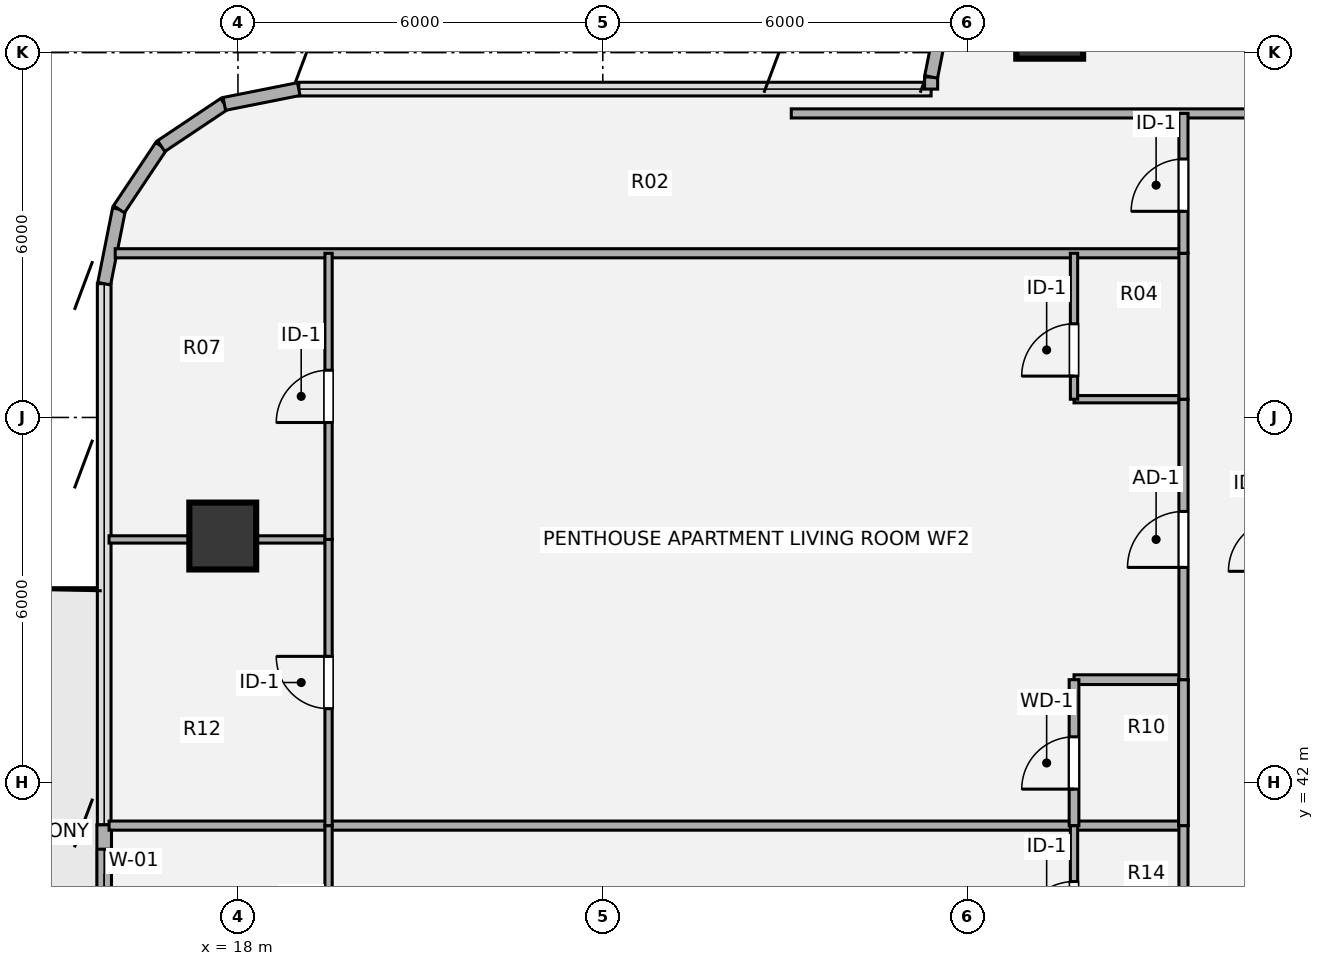
"""IFC4 building model, lengths in metres.
Left out: names, types, materials, properties, quantities, classifications, styles, units other than length and angle.
Written with IfcOpenShell. Run it as: python <this file> out.ifc"""

import sys

from ifc_helpers import new_model, si_unit, direction, frame, frame_2d, origin, origin_2d, place, context, subcontext, project, spatial, rectangle, hollow_circle, extrude, source, transform, mapped, element, fill, save


model = new_model("IFC4")
c1 = context("Model", 3, precision=1e-05, world=origin(), true_north=direction((0.0, 1.0)))
c2 = subcontext(c1, "Body", "Model", "MODEL_VIEW")
j1 = project(units=[si_unit("LENGTHUNIT", "METRE"), si_unit("PLANEANGLEUNIT", "RADIAN")], contexts=[c1])
p1 = place(None, origin())
s1 = spatial("IfcSite", under=j1, at=p1, CompositionType="ELEMENT")
p2 = place(p1, origin())
s2 = spatial("IfcBuilding", under=s1, at=p2, CompositionType="ELEMENT")
p3 = place(p2, frame((0.0, 0.0, 156.42)))
s3 = spatial("IfcBuildingStorey", under=s2, at=p3, CompositionType="ELEMENT", Elevation=156.42)
m1 = source(origin(), c2, "Body", "SweptSolid", [
    extrude(hollow_circle(Radius=0.55, WallThickness=0.04, at=origin_2d()), origin(), (0.0, 0.0, 1.0), 3.78),
])
for number, where, z_axis, x_axis in (
    (1, (17.75, 46.05, 0.0), (0.0, 0.0, 1.0), (1.0, 0.0, 0.0)),
    (2, (31.35, 54.45, 0.0), (0.0, 0.0, 1.0), (1.0, 0.0, 0.0)),
):
    element("IfcColumn", number, at=place(p3, frame(where, z_axis=z_axis, x_axis=x_axis)), inside=s3, PredefinedType="COLUMN", context=c2, shape_type="MappedRepresentation", body=[
        mapped(m1, transform((0.0, 0.0, 0.0), x_axis=(1.0, 0.0, 0.0), y_axis=(0.0, 1.0, 0.0), z_axis=(0.0, 0.0, 1.0), scale=1.0)),
    ])
p4 = place(p3, frame((15.8, 37.7, 0.0), z_axis=(0.0, 0.0, 1.0), x_axis=(0.0, 1.0, 0.0)))
e3 = element("IfcWall", 3, at=p4, inside=s3, PredefinedType="SOLIDWALL", context=c2, shape_type="SweptSolid", body=[
    extrude(rectangle(XDim=3.6, YDim=0.24, at=frame_2d((1.8, 0.0))), origin(), (0.0, 0.0, 1.0), 3.53),
])
p5 = place(p4, frame((0.4, 0.0, 0.0)))
e4 = element("IfcOpeningElement", 4, at=p5, cuts=e3, PredefinedType="OPENING", context=c2, shape_type="SweptSolid", body=[
    extrude(rectangle(XDim=1.05, YDim=2.15, at=origin_2d()), frame((0.525, 0.13, 1.075), z_axis=(0.0, -1.0, 0.0), x_axis=(1.0, 0.0, 0.0)), (0.0, 0.0, 1.0), 0.26),
])
p6 = place(p4, frame((1.85, 0.0, 0.85)))
e5 = element("IfcOpeningElement", 5, at=p6, cuts=e3, PredefinedType="OPENING", context=c2, shape_type="SweptSolid", body=[
    extrude(rectangle(XDim=1.35, YDim=1.35, at=origin_2d()), frame((0.675, 0.13, 0.675), z_axis=(0.0, -1.0, 0.0), x_axis=(1.0, 0.0, 0.0)), (0.0, 0.0, 1.0), 0.26),
])
for number, where, z_axis, x_axis in (
    (6, (15.8, 50.2, 0.0), (0.0, 0.0, 1.0), (0.195, 0.981, 0.0)),
    (7, (16.044, 51.425, 0.0), (0.0, 0.0, 1.0), (0.556, 0.831, 0.0)),
    (8, (16.737, 52.463, 0.0), (0.0, 0.0, 1.0), (0.831, 0.556, 0.0)),
    (9, (17.775, 53.156, 0.0), (0.0, 0.0, 1.0), (0.981, 0.195, 0.0)),
):
    element("IfcWall", number, at=place(p3, frame(where, z_axis=z_axis, x_axis=x_axis)), inside=s3, PredefinedType="SOLIDWALL", context=c2, shape_type="SweptSolid", body=[
        extrude(rectangle(XDim=1.249, YDim=0.215, at=frame_2d((0.624, 0.0))), origin(), (0.0, 0.0, 1.0), 3.53),
    ])
p7 = place(p3, frame((29.4, 53.4, 0.0), z_axis=(0.0, 0.0, 1.0), x_axis=(0.0, 1.0, 0.0)))
e10 = element("IfcWall", 10, at=p7, inside=s3, PredefinedType="SOLIDWALL", context=c2, shape_type="SweptSolid", body=[
    extrude(rectangle(XDim=0.2, YDim=0.215, at=frame_2d((0.1, 0.0))), origin(), (0.0, 0.0, 1.0), 3.53),
])
p8 = place(p3, frame((29.4, 53.6, 0.0), z_axis=(0.0, 0.0, 1.0), x_axis=(0.195127417394, 0.980777900945, 0.0)))
e11 = element("IfcWall", 11, at=p8, inside=s3, PredefinedType="SOLIDWALL", context=c2, shape_type="SweptSolid", body=[
    extrude(rectangle(XDim=1.092, YDim=0.215, at=frame_2d((0.546, 0.0))), origin(), (0.0, 0.0, 1.0), 3.53),
])
p9 = place(p3, frame((15.88, 41.288, 0.0), z_axis=(0.0, 0.0, 1.0), x_axis=(1.0, 0.0, 0.0)))
e12 = element("IfcWall", 12, at=p9, inside=s3, PredefinedType="PARTITIONING", context=c2, shape_type="SweptSolid", body=[
    extrude(rectangle(XDim=17.67, YDim=0.15, at=frame_2d((8.835, 0.0))), origin(), (0.0, 0.0, 1.0), 2.982),
])
p10 = place(p3, frame((31.75, 43.688, 0.0), z_axis=(0.0, 0.0, 1.0), x_axis=(1.0, 0.0, 0.0)))
e13 = element("IfcWall", 13, at=p10, inside=s3, PredefinedType="PLUMBINGWALL", context=c2, shape_type="SweptSolid", body=[
    extrude(rectangle(XDim=1.8, YDim=0.16, at=frame_2d((0.9, 0.0))), origin(), (0.0, 0.0, 1.0), 3.259),
])
p11 = place(p3, frame((15.88, 45.994, 0.0), z_axis=(0.0, 0.0, 1.0), x_axis=(1.0, 0.0, 0.0)))
e14 = element("IfcWall", 14, at=p11, inside=s3, PredefinedType="PARTITIONING", context=c2, shape_type="SweptSolid", body=[
    extrude(rectangle(XDim=3.61, YDim=0.12, at=frame_2d((1.805, 0.0))), origin(), (0.0, 0.0, 1.0), 2.903),
])
p12 = place(p3, frame((31.75, 48.3, 0.0), z_axis=(0.0, 0.0, 1.0), x_axis=(1.0, 0.0, 0.0)))
e15 = element("IfcWall", 15, at=p12, inside=s3, PredefinedType="PARTITIONING", context=c2, shape_type="SweptSolid", body=[
    extrude(rectangle(XDim=1.8, YDim=0.12, at=frame_2d((0.9, 0.0))), origin(), (0.0, 0.0, 1.0), 3.259),
])
p13 = place(p3, frame((15.981, 50.7, 0.0), z_axis=(0.0, 0.0, 1.0), x_axis=(1.0, 0.0, 0.0)))
e16 = element("IfcWall", 16, at=p13, inside=s3, PredefinedType="PARTITIONING", context=c2, shape_type="SweptSolid", body=[
    extrude(rectangle(XDim=17.569, YDim=0.15, at=frame_2d((8.785, 0.0))), origin(), (0.0, 0.0, 1.0), 3.308),
])
p14 = place(p3, frame((27.1, 53.0, 0.0), z_axis=(0.0, 0.0, 1.0), x_axis=(1.0, 0.0, 0.0)))
e17 = element("IfcWall", 17, at=p14, inside=s3, PredefinedType="PARTITIONING", context=c2, shape_type="SweptSolid", body=[
    extrude(rectangle(XDim=17.8, YDim=0.15, at=frame_2d((8.9, 0.0))), origin(), (0.0, 0.0, 1.0), 3.308),
])
p15 = place(p14, frame((8.375, 0.0, 0.0)))
e18 = element("IfcOpeningElement", 18, at=p15, cuts=e17, PredefinedType="OPENING", context=c2, shape_type="SweptSolid", body=[
    extrude(rectangle(XDim=1.05, YDim=2.1, at=origin_2d()), frame((0.525, 0.085, 1.05), z_axis=(0.0, -1.0, 0.0), x_axis=(1.0, 0.0, 0.0)), (0.0, 0.0, 1.0), 0.17),
])
p16 = place(p3, frame((19.49, 36.944, 0.0), z_axis=(0.0, 0.0, 1.0), x_axis=(0.0, 1.0, 0.0)))
e19 = element("IfcWall", 19, at=p16, inside=s3, PredefinedType="PARTITIONING", context=c2, shape_type="SweptSolid", body=[
    extrude(rectangle(XDim=4.344, YDim=0.12, at=frame_2d((2.172, 0.0))), origin(), (0.0, 0.0, 1.0), 3.5),
])
p17 = place(p16, frame((1.742, 0.0, 0.0)))
e20 = element("IfcOpeningElement", 20, at=p17, cuts=e19, PredefinedType="OPENING", context=c2, shape_type="SweptSolid", body=[
    extrude(rectangle(XDim=0.86, YDim=2.1, at=origin_2d()), frame((0.43, 0.07, 1.05), z_axis=(0.0, -1.0, 0.0), x_axis=(1.0, 0.0, 0.0)), (0.0, 0.0, 1.0), 0.14),
])
p18 = place(p3, frame((19.49, 41.288, 0.0), z_axis=(0.0, 0.0, 1.0), x_axis=(0.0, 1.0, 0.0)))
e21 = element("IfcWall", 21, at=p18, inside=s3, PredefinedType="PARTITIONING", context=c2, shape_type="SweptSolid", body=[
    extrude(rectangle(XDim=4.706, YDim=0.12, at=frame_2d((2.353, 0.0))), origin(), (0.0, 0.0, 1.0), 3.5),
])
p19 = place(p18, frame((1.923, 0.0, 0.0)))
e22 = element("IfcOpeningElement", 22, at=p19, cuts=e21, PredefinedType="OPENING", context=c2, shape_type="SweptSolid", body=[
    extrude(rectangle(XDim=0.86, YDim=2.1, at=origin_2d()), frame((0.43, 0.07, 1.05), z_axis=(0.0, -1.0, 0.0), x_axis=(1.0, 0.0, 0.0)), (0.0, 0.0, 1.0), 0.14),
])
p20 = place(p3, frame((19.49, 45.994, 0.0), z_axis=(0.0, 0.0, 1.0), x_axis=(0.0, 1.0, 0.0)))
e23 = element("IfcWall", 23, at=p20, inside=s3, PredefinedType="PARTITIONING", context=c2, shape_type="SweptSolid", body=[
    extrude(rectangle(XDim=4.706, YDim=0.12, at=frame_2d((2.353, 0.0))), origin(), (0.0, 0.0, 1.0), 3.5),
])
p21 = place(p20, frame((1.923, 0.0, 0.0)))
e24 = element("IfcOpeningElement", 24, at=p21, cuts=e23, PredefinedType="OPENING", context=c2, shape_type="SweptSolid", body=[
    extrude(rectangle(XDim=0.86, YDim=2.1, at=origin_2d()), frame((0.43, 0.07, 1.05), z_axis=(0.0, -1.0, 0.0), x_axis=(1.0, 0.0, 0.0)), (0.0, 0.0, 1.0), 0.14),
])
p22 = place(p3, frame((31.75, 38.888, 0.0), z_axis=(0.0, 0.0, 1.0), x_axis=(0.0, 1.0, 0.0)))
e25 = element("IfcWall", 25, at=p22, inside=s3, PredefinedType="PARTITIONING", context=c2, shape_type="SweptSolid", body=[
    extrude(rectangle(XDim=2.4, YDim=0.12, at=frame_2d((1.2, 0.0))), origin(), (0.0, 0.0, 1.0), 3.5),
])
p23 = place(p22, frame((0.62, 0.0, 0.0)))
e26 = element("IfcOpeningElement", 26, at=p23, cuts=e25, PredefinedType="OPENING", context=c2, shape_type="SweptSolid", body=[
    extrude(rectangle(XDim=0.86, YDim=2.1, at=origin_2d()), frame((0.43, 0.07, 1.05), z_axis=(0.0, -1.0, 0.0), x_axis=(1.0, 0.0, 0.0)), (0.0, 0.0, 1.0), 0.14),
])
p24 = place(p3, frame((31.75, 41.288, 0.0), z_axis=(0.0, 0.0, 1.0), x_axis=(0.0, 1.0, 0.0)))
e27 = element("IfcWall", 27, at=p24, inside=s3, PredefinedType="PLUMBINGWALL", context=c2, shape_type="SweptSolid", body=[
    extrude(rectangle(XDim=2.4, YDim=0.16, at=frame_2d((1.2, 0.0))), origin(), (0.0, 0.0, 1.0), 3.5),
])
p25 = place(p24, frame((0.6, 0.0, 0.0)))
e28 = element("IfcOpeningElement", 28, at=p25, cuts=e27, PredefinedType="OPENING", context=c2, shape_type="SweptSolid", body=[
    extrude(rectangle(XDim=0.86, YDim=2.1, at=origin_2d()), frame((0.43, 0.09, 1.05), z_axis=(0.0, -1.0, 0.0), x_axis=(1.0, 0.0, 0.0)), (0.0, 0.0, 1.0), 0.18),
])
p26 = place(p3, frame((31.75, 48.3, 0.0), z_axis=(0.0, 0.0, 1.0), x_axis=(0.0, 1.0, 0.0)))
e29 = element("IfcWall", 29, at=p26, inside=s3, PredefinedType="PARTITIONING", context=c2, shape_type="SweptSolid", body=[
    extrude(rectangle(XDim=2.4, YDim=0.12, at=frame_2d((1.2, 0.0))), origin(), (0.0, 0.0, 1.0), 3.5),
])
p27 = place(p26, frame((0.38, 0.0, 0.0)))
e30 = element("IfcOpeningElement", 30, at=p27, cuts=e29, PredefinedType="OPENING", context=c2, shape_type="SweptSolid", body=[
    extrude(rectangle(XDim=0.86, YDim=2.1, at=origin_2d()), frame((0.43, 0.07, 1.05), z_axis=(0.0, -1.0, 0.0), x_axis=(1.0, 0.0, 0.0)), (0.0, 0.0, 1.0), 0.14),
])
p28 = place(p3, frame((33.55, 38.888, 0.0), z_axis=(0.0, 0.0, 1.0), x_axis=(0.0, 1.0, 0.0)))
e31 = element("IfcWall", 31, at=p28, inside=s3, PredefinedType="PARTITIONING", context=c2, shape_type="SweptSolid", body=[
    extrude(rectangle(XDim=2.4, YDim=0.15, at=frame_2d((1.2, 0.0))), origin(), (0.0, 0.0, 1.0), 3.5),
])
p29 = place(p3, frame((33.55, 41.288, 0.0), z_axis=(0.0, 0.0, 1.0), x_axis=(0.0, 1.0, 0.0)))
e32 = element("IfcWall", 32, at=p29, inside=s3, PredefinedType="PLUMBINGWALL", context=c2, shape_type="SweptSolid", body=[
    extrude(rectangle(XDim=2.4, YDim=0.16, at=frame_2d((1.2, 0.0))), origin(), (0.0, 0.0, 1.0), 3.5),
])
p30 = place(p3, frame((33.55, 43.688, 0.0), z_axis=(0.0, 0.0, 1.0), x_axis=(0.0, 1.0, 0.0)))
e33 = element("IfcWall", 33, at=p30, inside=s3, PredefinedType="PARTITIONING", context=c2, shape_type="SweptSolid", body=[
    extrude(rectangle(XDim=4.612, YDim=0.15, at=frame_2d((2.306, 0.0))), origin(), (0.0, 0.0, 1.0), 3.5),
])
p31 = place(p30, frame((1.846, 0.0, 0.0)))
e34 = element("IfcOpeningElement", 34, at=p31, cuts=e33, PredefinedType="OPENING", context=c2, shape_type="SweptSolid", body=[
    extrude(rectangle(XDim=0.92, YDim=2.1, at=origin_2d()), frame((0.46, 0.085, 1.05), z_axis=(0.0, -1.0, 0.0), x_axis=(1.0, 0.0, 0.0)), (0.0, 0.0, 1.0), 0.17),
])
p32 = place(p3, frame((33.55, 48.3, 0.0), z_axis=(0.0, 0.0, 1.0), x_axis=(0.0, 1.0, 0.0)))
e35 = element("IfcWall", 35, at=p32, inside=s3, PredefinedType="PARTITIONING", context=c2, shape_type="SweptSolid", body=[
    extrude(rectangle(XDim=2.4, YDim=0.15, at=frame_2d((1.2, 0.0))), origin(), (0.0, 0.0, 1.0), 3.5),
])
p33 = place(p3, frame((33.55, 50.7, 0.0), z_axis=(0.0, 0.0, 1.0), x_axis=(0.0, 1.0, 0.0)))
e36 = element("IfcWall", 36, at=p33, inside=s3, PredefinedType="PARTITIONING", context=c2, shape_type="SweptSolid", body=[
    extrude(rectangle(XDim=2.3, YDim=0.15, at=frame_2d((1.15, 0.0))), origin(), (0.0, 0.0, 1.0), 3.5),
])
p34 = place(p33, frame((0.69, 0.0, 0.0)))
e37 = element("IfcOpeningElement", 37, at=p34, cuts=e36, PredefinedType="OPENING", context=c2, shape_type="SweptSolid", body=[
    extrude(rectangle(XDim=0.86, YDim=2.1, at=origin_2d()), frame((0.43, 0.085, 1.05), z_axis=(0.0, -1.0, 0.0), x_axis=(1.0, 0.0, 0.0)), (0.0, 0.0, 1.0), 0.17),
])
m2 = source(origin(), c2, "Body", "SweptSolid", [
    extrude(rectangle(XDim=1.35, YDim=1.35, at=origin_2d()), frame((0.675, 0.03, 0.675), z_axis=(0.0, -1.0, 0.0), x_axis=(1.0, 0.0, 0.0)), (0.0, 0.0, 1.0), 0.06),
])
p35 = place(p6, origin())
e38 = element("IfcWindow", 38, at=p35, inside=s3, PartitioningType="SINGLE_PANEL", PredefinedType="WINDOW", context=c2, shape_type="MappedRepresentation", body=[
    mapped(m2, transform((0.0, 0.0, 0.0), x_axis=(1.0, 0.0, 0.0), y_axis=(0.0, 1.0, 0.0), z_axis=(0.0, 0.0, 1.0), scale=1.0)),
])
fill(e5, e38)
m3 = source(origin(), c2, "Body", "SweptSolid", [
    extrude(rectangle(XDim=0.86, YDim=2.1, at=origin_2d()), frame((0.43, 0.025, 1.05), z_axis=(0.0, -1.0, 0.0), x_axis=(1.0, 0.0, 0.0)), (0.0, 0.0, 1.0), 0.05),
])
p36 = place(p19, origin())
e39 = element("IfcDoor", 39, at=p36, inside=s3, OperationType="SINGLE_SWING_RIGHT", PredefinedType="DOOR", context=c2, shape_type="MappedRepresentation", body=[
    mapped(m3, transform((0.0, 0.0, 0.0), x_axis=(1.0, 0.0, 0.0), y_axis=(0.0, 1.0, 0.0), z_axis=(0.0, 0.0, 1.0), scale=1.0)),
])
fill(e22, e39)
p37 = place(p21, origin())
e40 = element("IfcDoor", 40, at=p37, inside=s3, OperationType="SINGLE_SWING_LEFT", PredefinedType="DOOR", context=c2, shape_type="MappedRepresentation", body=[
    mapped(m3, transform((0.0, 0.0, 0.0), x_axis=(1.0, 0.0, 0.0), y_axis=(0.0, 1.0, 0.0), z_axis=(0.0, 0.0, 1.0), scale=1.0)),
])
fill(e24, e40)
p38 = place(p23, origin())
e41 = element("IfcDoor", 41, at=p38, inside=s3, OperationType="SINGLE_SWING_LEFT", PredefinedType="DOOR", context=c2, shape_type="MappedRepresentation", body=[
    mapped(m3, transform((0.0, 0.0, 0.0), x_axis=(1.0, 0.0, 0.0), y_axis=(0.0, 1.0, 0.0), z_axis=(0.0, 0.0, 1.0), scale=1.0)),
])
fill(e26, e41)
m4 = source(origin(), c2, "Body", "SweptSolid", [
    extrude(rectangle(XDim=0.86, YDim=2.1, at=origin_2d()), frame((0.43, 0.025, 1.05), z_axis=(0.0, -1.0, 0.0), x_axis=(1.0, 0.0, 0.0)), (0.0, 0.0, 1.0), 0.05),
])
p39 = place(p25, origin())
e42 = element("IfcDoor", 42, at=p39, inside=s3, OperationType="SINGLE_SWING_LEFT", PredefinedType="DOOR", context=c2, shape_type="MappedRepresentation", body=[
    mapped(m4, transform((0.0, 0.0, 0.0), x_axis=(1.0, 0.0, 0.0), y_axis=(0.0, 1.0, 0.0), z_axis=(0.0, 0.0, 1.0), scale=1.0)),
])
fill(e28, e42)
p40 = place(p27, origin())
e43 = element("IfcDoor", 43, at=p40, inside=s3, OperationType="SINGLE_SWING_LEFT", PredefinedType="DOOR", context=c2, shape_type="MappedRepresentation", body=[
    mapped(m3, transform((0.0, 0.0, 0.0), x_axis=(1.0, 0.0, 0.0), y_axis=(0.0, 1.0, 0.0), z_axis=(0.0, 0.0, 1.0), scale=1.0)),
])
fill(e30, e43)
m5 = source(origin(), c2, "Body", "SweptSolid", [
    extrude(rectangle(XDim=0.92, YDim=2.1, at=origin_2d()), frame((0.46, 0.025, 1.05), z_axis=(0.0, -1.0, 0.0), x_axis=(1.0, 0.0, 0.0)), (0.0, 0.0, 1.0), 0.05),
])
p41 = place(p31, origin())
e44 = element("IfcDoor", 44, at=p41, inside=s3, OperationType="SINGLE_SWING_LEFT", PredefinedType="DOOR", context=c2, shape_type="MappedRepresentation", body=[
    mapped(m5, transform((0.0, 0.0, 0.0), x_axis=(1.0, 0.0, 0.0), y_axis=(0.0, 1.0, 0.0), z_axis=(0.0, 0.0, 1.0), scale=1.0)),
])
fill(e34, e44)
p42 = place(p34, origin())
e45 = element("IfcDoor", 45, at=p42, inside=s3, OperationType="SINGLE_SWING_LEFT", PredefinedType="DOOR", context=c2, shape_type="MappedRepresentation", body=[
    mapped(m3, transform((0.0, 0.0, 0.0), x_axis=(1.0, 0.0, 0.0), y_axis=(0.0, 1.0, 0.0), z_axis=(0.0, 0.0, 1.0), scale=1.0)),
])
fill(e37, e45)
save(model, sys.argv[1])
